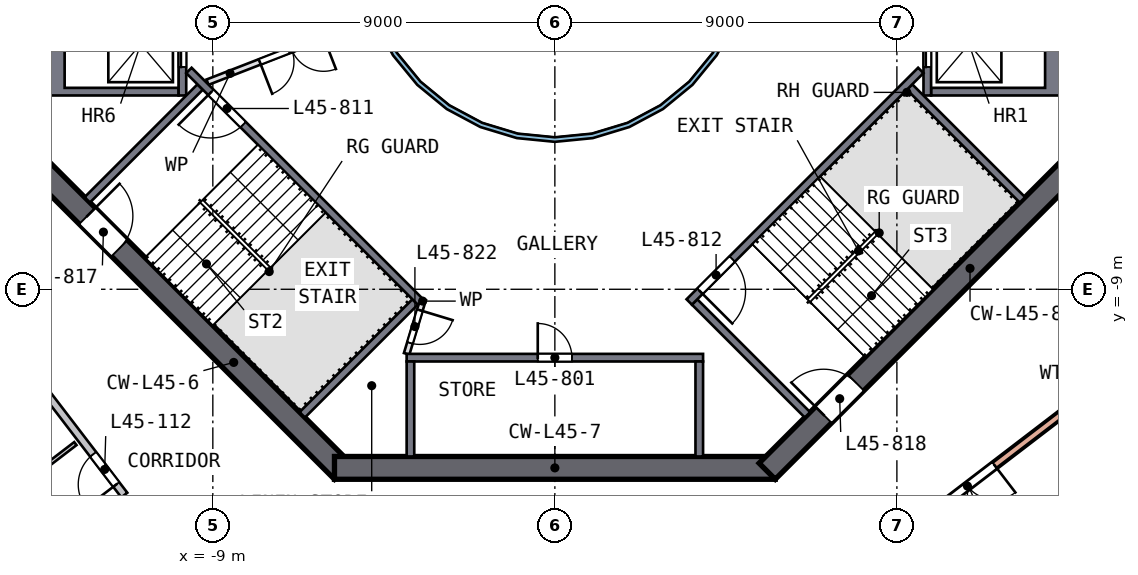
"""IFC4 building model, lengths in metres.
Left out: names, types, materials, properties, quantities, classifications, styles, units other than length and angle.
Written with IfcOpenShell. Run it as: python <this file> out.ifc"""

import sys

from ifc_helpers import new_model, si_unit, direction, frame, frame_2d, origin, place, context, subcontext, project, spatial, polyline, rectangle, outline, extrude, element, fill, save


model = new_model("IFC4")
c1 = context("Model", 3, precision=1e-05, world=origin(), true_north=direction((0.0, 1.0)))
c2 = subcontext(c1, "Body", "Model", "MODEL_VIEW")
j1 = project(units=[si_unit("LENGTHUNIT", "METRE"), si_unit("PLANEANGLEUNIT", "RADIAN")], contexts=[c1])
p1 = place(None, origin())
s1 = spatial("IfcSite", under=j1, at=p1, CompositionType="ELEMENT")
p2 = place(p1, origin())
s2 = spatial("IfcBuilding", under=s1, at=p2, CompositionType="ELEMENT")
p3 = place(p2, frame((0.0, 0.0, 187.0)))
s3 = spatial("IfcBuildingStorey", under=s2, at=p3, CompositionType="ELEMENT", Elevation=187.0)
p4 = place(p3, frame((-13.788, -5.587, 0.0), z_axis=(0.0, 0.0, 1.0), x_axis=(0.707106781, -0.707106781, 0.0)))
e1 = element("IfcWall", 1, at=p4, inside=s3, PredefinedType="SHEAR", context=c2, shape_type="SweptSolid", body=[
    extrude(rectangle(XDim=11.598, YDim=0.6, at=frame_2d((5.799, 0.0))), origin(), (0.0, 0.0, 1.0), 3.5),
])
p5 = place(p4, frame((2.099, 0.0, 0.0)))
e2 = element("IfcOpeningElement", 2, at=p5, cuts=e1, PredefinedType="OPENING", context=c2, shape_type="SweptSolid", body=[
    extrude(rectangle(XDim=1.2, YDim=2.1, at=frame_2d((0.6, 1.05))), frame((0.0, 0.31, 0.0), z_axis=(0.0, -1.0, 0.0), x_axis=(1.0, 0.0, 0.0)), (0.0, 0.0, 1.0), 0.62),
])
p6 = place(p3, frame((-5.799, -13.7, 0.0), z_axis=(0.0, 0.0, 1.0), x_axis=(1.0, 0.0, 0.0)))
e3 = element("IfcWall", 3, at=p6, inside=s3, PredefinedType="SHEAR", context=c2, shape_type="SweptSolid", body=[
    extrude(rectangle(XDim=11.598, YDim=0.6, at=frame_2d((5.799, 0.0))), origin(), (0.0, 0.0, 1.0), 3.5),
])
p7 = place(p3, frame((5.587, -13.788, 0.0), z_axis=(0.0, 0.0, 1.0), x_axis=(0.707106781, 0.707106781, 0.0)))
e4 = element("IfcWall", 4, at=p7, inside=s3, PredefinedType="SHEAR", context=c2, shape_type="SweptSolid", body=[
    extrude(rectangle(XDim=11.598, YDim=0.6, at=frame_2d((5.799, 0.0))), origin(), (0.0, 0.0, 1.0), 3.5),
])
p8 = place(p7, frame((2.099, 0.0, 0.0)))
e5 = element("IfcOpeningElement", 5, at=p8, cuts=e4, PredefinedType="OPENING", context=c2, shape_type="SweptSolid", body=[
    extrude(rectangle(XDim=1.2, YDim=2.1, at=frame_2d((0.6, 1.05))), frame((0.0, 0.31, 0.0), z_axis=(0.0, -1.0, 0.0), x_axis=(1.0, 0.0, 0.0)), (0.0, 0.0, 1.0), 0.62),
])
p9 = place(p3, frame((16.018, -10.228, 0.0), z_axis=(0.0, 0.0, 1.0), x_axis=(-0.793988274, -0.607933072, 0.0)))
e6 = element("IfcWall", 6, at=p9, inside=s3, PredefinedType="SOLIDWALL", context=c2, shape_type="SweptSolid", body=[
    extrude(rectangle(XDim=13.0, YDim=0.2, at=frame_2d((6.5, 0.0))), origin(), (0.0, 0.0, 1.0), 3.19),
])
p10 = place(p9, frame((5.6, 0.0, 0.0)))
e7 = element("IfcOpeningElement", 7, at=p10, cuts=e6, PredefinedType="OPENING", context=c2, shape_type="SweptSolid", body=[
    extrude(rectangle(XDim=1.8, YDim=2.4, at=frame_2d((0.9, 1.2))), frame((0.0, 0.11, 0.0), z_axis=(0.0, -1.0, 0.0), x_axis=(1.0, 0.0, 0.0)), (0.0, 0.0, 1.0), 0.22),
])
p11 = place(p3, origin())
e8 = element("IfcWall", 8, at=p11, inside=s3, PredefinedType="SOLIDWALL", context=c2, shape_type="SweptSolid", body=[
    extrude(outline(polyline([(13.4, -3.9), (9.9, -3.9), (9.9, -3.7), (12.9, -3.7), (12.9, -1.4), (9.9, -1.4), (9.9, -1.2), (13.4, -1.2), (13.4, -3.9)])), origin(), (0.0, 0.0, 1.0), 3.19),
])
p12 = place(p3, frame((9.8, -1.2, 0.0), z_axis=(0.0, 0.0, 1.0), x_axis=(0.0, -1.0, 0.0)))
e9 = element("IfcWall", 9, at=p12, inside=s3, PredefinedType="SOLIDWALL", context=c2, shape_type="SweptSolid", body=[
    extrude(rectangle(XDim=2.7, YDim=0.2, at=frame_2d((1.35, 0.0))), origin(), (0.0, 0.0, 1.0), 3.19),
])
p13 = place(p12, frame((0.75, 0.0, 0.0)))
e10 = element("IfcOpeningElement", 10, at=p13, cuts=e9, PredefinedType="OPENING", context=c2, shape_type="SweptSolid", body=[
    extrude(rectangle(XDim=1.2, YDim=2.1, at=frame_2d((0.6, 1.05))), frame((0.0, 0.11, 0.0), z_axis=(0.0, -1.0, 0.0), x_axis=(1.0, 0.0, 0.0)), (0.0, 0.0, 1.0), 0.22),
])
p14 = place(p3, origin())
e11 = element("IfcWall", 11, at=p14, inside=s3, PredefinedType="SOLIDWALL", context=c2, shape_type="SweptSolid", body=[
    extrude(outline(polyline([(-13.4, -3.9), (-13.4, -1.2), (-9.9, -1.2), (-9.9, -1.4), (-12.9, -1.4), (-12.9, -3.7), (-9.9, -3.7), (-9.9, -3.9), (-13.4, -3.9)])), origin(), (0.0, 0.0, 1.0), 3.19),
])
p15 = place(p3, frame((-9.8, -1.2, 0.0), z_axis=(0.0, 0.0, 1.0), x_axis=(0.0, -1.0, 0.0)))
e12 = element("IfcWall", 12, at=p15, inside=s3, PredefinedType="SOLIDWALL", context=c2, shape_type="SweptSolid", body=[
    extrude(rectangle(XDim=2.7, YDim=0.2, at=frame_2d((1.35, 0.0))), origin(), (0.0, 0.0, 1.0), 3.19),
])
p16 = place(p15, frame((0.75, 0.0, 0.0)))
e13 = element("IfcOpeningElement", 13, at=p16, cuts=e12, PredefinedType="OPENING", context=c2, shape_type="SweptSolid", body=[
    extrude(rectangle(XDim=1.2, YDim=2.1, at=frame_2d((0.6, 1.05))), frame((0.0, 0.11, 0.0), z_axis=(0.0, -1.0, 0.0), x_axis=(1.0, 0.0, 0.0)), (0.0, 0.0, 1.0), 0.22),
])
p17 = place(p3, frame((-3.9, -10.8, 0.0), z_axis=(0.0, 0.0, 1.0), x_axis=(1.0, 0.0, 0.0)))
e14 = element("IfcWall", 14, at=p17, inside=s3, PredefinedType="SOLIDWALL", context=c2, shape_type="SweptSolid", body=[
    extrude(rectangle(XDim=7.8, YDim=0.2, at=frame_2d((3.9, 0.0))), origin(), (0.0, 0.0, 1.0), 3.19),
])
p18 = place(p17, frame((3.45, 0.0, 0.0)))
e15 = element("IfcOpeningElement", 15, at=p18, cuts=e14, PredefinedType="OPENING", context=c2, shape_type="SweptSolid", body=[
    extrude(rectangle(XDim=0.9, YDim=2.1, at=frame_2d((0.45, 1.05))), frame((0.0, 0.11, 0.0), z_axis=(0.0, -1.0, 0.0), x_axis=(1.0, 0.0, 0.0)), (0.0, 0.0, 1.0), 0.22),
])
for number, where, z_axis, x_axis in (
    (16, (-3.8, -10.9, 0.0), (0.0, 0.0, 1.0), (0.0, -1.0, 0.0)),
    (17, (3.8, -10.9, 0.0), (0.0, 0.0, 1.0), (0.0, -1.0, 0.0)),
):
    element("IfcWall", number, at=place(p3, frame(where, z_axis=z_axis, x_axis=x_axis)), inside=s3, PredefinedType="SOLIDWALL", context=c2, shape_type="SweptSolid", body=[
        extrude(rectangle(XDim=2.5, YDim=0.2, at=frame_2d((1.25, 0.0))), origin(), (0.0, 0.0, 1.0), 3.19),
    ])
p19 = place(p3, frame((-3.535, -9.334, 0.0), z_axis=(0.0, 0.0, 1.0), x_axis=(-0.707120946, 0.707092617, 0.0)))
e18 = element("IfcWall", 18, at=p19, inside=s3, PredefinedType="SOLIDWALL", context=c2, shape_type="SweptSolid", body=[
    extrude(rectangle(XDim=8.618, YDim=0.2, at=frame_2d((4.309, 0.0))), origin(), (0.0, 0.0, 1.0), 3.19),
])
p20 = place(p19, frame((6.6, 0.0, 0.0)))
e19 = element("IfcOpeningElement", 19, at=p20, cuts=e18, PredefinedType="OPENING", context=c2, shape_type="SweptSolid", body=[
    extrude(rectangle(XDim=1.2, YDim=2.1, at=frame_2d((0.6, 1.05))), frame((0.0, 0.11, 0.0), z_axis=(0.0, -1.0, 0.0), x_axis=(1.0, 0.0, 0.0)), (0.0, 0.0, 1.0), 0.22),
])
for number, where, z_axis, x_axis in (
    (20, (-9.334, -3.677, 0.0), (0.0, 0.0, 1.0), (-0.707, -0.707, 0.0)),
    (21, (-3.677, -9.334, 0.0), (0.0, 0.0, 1.0), (-0.707, -0.707, 0.0)),
):
    element("IfcWall", number, at=place(p3, frame(where, z_axis=z_axis, x_axis=x_axis)), inside=s3, PredefinedType="SOLIDWALL", context=c2, shape_type="SweptSolid", body=[
        extrude(rectangle(XDim=4.2, YDim=0.2, at=frame_2d((2.1, 0.0))), origin(), (0.0, 0.0, 1.0), 3.19),
    ])
p21 = place(p3, frame((9.629, -3.24, 0.0), z_axis=(0.0, 0.0, 1.0), x_axis=(-0.707120946, -0.707092617, 0.0)))
e22 = element("IfcWall", 22, at=p21, inside=s3, PredefinedType="SOLIDWALL", context=c2, shape_type="SweptSolid", body=[
    extrude(rectangle(XDim=8.618, YDim=0.2, at=frame_2d((4.309, 0.0))), origin(), (0.0, 0.0, 1.0), 3.19),
])
p22 = place(p21, frame((7.018, 0.0, 0.0)))
e23 = element("IfcOpeningElement", 23, at=p22, cuts=e22, PredefinedType="OPENING", context=c2, shape_type="SweptSolid", body=[
    extrude(rectangle(XDim=1.2, YDim=2.1, at=frame_2d((0.6, 1.05))), frame((0.0, 0.11, 0.0), z_axis=(0.0, -1.0, 0.0), x_axis=(1.0, 0.0, 0.0)), (0.0, 0.0, 1.0), 0.22),
])
for number, where, z_axis, x_axis in (
    (24, (3.677, -9.334, 0.0), (0.0, 0.0, 1.0), (0.707, -0.707, 0.0)),
    (25, (9.334, -3.677, 0.0), (0.0, 0.0, 1.0), (0.707, -0.707, 0.0)),
):
    element("IfcWall", number, at=place(p3, frame(where, z_axis=z_axis, x_axis=x_axis)), inside=s3, PredefinedType="SOLIDWALL", context=c2, shape_type="SweptSolid", body=[
        extrude(rectangle(XDim=4.2, YDim=0.2, at=frame_2d((2.1, 0.0))), origin(), (0.0, 0.0, 1.0), 3.19),
    ])
p23 = place(p3, frame((-3.465, -9.263, 0.0), z_axis=(0.0, 0.0, 1.0), x_axis=(-0.289808785, -0.957084567, 0.0)))
e26 = element("IfcWall", 26, at=p23, inside=s3, PredefinedType="PARTITIONING", context=c2, shape_type="SweptSolid", body=[
    extrude(rectangle(XDim=1.501, YDim=0.15, at=frame_2d((0.75, 0.0))), origin(), (0.0, 0.0, 1.0), 3.19),
])
p24 = place(p23, frame((0.301, 0.0, 0.0)))
e27 = element("IfcOpeningElement", 27, at=p24, cuts=e26, PredefinedType="OPENING", context=c2, shape_type="SweptSolid", body=[
    extrude(rectangle(XDim=0.9, YDim=2.1, at=frame_2d((0.45, 1.05))), frame((0.0, 0.085, 0.0), z_axis=(0.0, -1.0, 0.0), x_axis=(1.0, 0.0, 0.0)), (0.0, 0.0, 1.0), 0.17),
])
p25 = place(p3, frame((-4.782, -1.857, 0.0), z_axis=(0.0, 0.0, 1.0), x_axis=(-0.932157474, -0.362053096, 0.0)))
e28 = element("IfcWall", 28, at=p25, inside=s3, PredefinedType="PARTITIONING", context=c2, shape_type="SweptSolid", body=[
    extrude(rectangle(XDim=4.675, YDim=0.15, at=frame_2d((2.337, 0.0))), origin(), (0.0, 0.0, 1.0), 3.19),
])
p26 = place(p25, frame((1.4, 0.0, 0.0)))
e29 = element("IfcOpeningElement", 29, at=p26, cuts=e28, PredefinedType="OPENING", context=c2, shape_type="SweptSolid", body=[
    extrude(rectangle(XDim=1.8, YDim=2.1, at=frame_2d((0.9, 1.05))), frame((0.0, 0.085, 0.0), z_axis=(0.0, -1.0, 0.0), x_axis=(1.0, 0.0, 0.0)), (0.0, 0.0, 1.0), 0.17),
])
p27 = place(p3, origin())
e30 = element("IfcWall", 30, at=p27, inside=s3, PredefinedType="SOLIDWALL", context=c2, shape_type="SweptSolid", body=[
    extrude(outline(polyline([(5.021, -0.999), (4.73, -1.959), (4.257, -2.844), (3.62, -3.62), (2.844, -4.257), (1.959, -4.73), (0.999, -5.021), (0.0, -5.12), (-0.999, -5.021), (-1.959, -4.73), (-2.844, -4.257), (-3.62, -3.62), (-4.257, -2.844), (-4.73, -1.959), (-5.021, -0.999), (-5.12, 0.0), (-5.021, 0.999), (-4.73, 1.959), (-4.257, 2.844), (-3.62, 3.62), (-2.844, 4.257), (-1.959, 4.73), (-0.999, 5.021), (0.0, 5.12), (0.999, 5.021), (1.959, 4.73), (2.844, 4.257), (3.62, 3.62), (4.257, 2.844), (4.73, 1.959), (5.021, 0.999), (5.12, 0.0), (5.021, -0.999)]), holes=[polyline([(4.904, 0.976), (4.619, 1.913), (4.157, 2.778), (3.535, 3.535), (2.778, 4.157), (1.913, 4.619), (0.976, 4.904), (0.0, 5.0), (-0.976, 4.904), (-1.913, 4.619), (-2.778, 4.157), (-3.535, 3.535), (-4.157, 2.778), (-4.619, 1.913), (-4.904, 0.976), (-5.0, 0.0), (-4.904, -0.976), (-4.619, -1.913), (-4.157, -2.778), (-3.535, -3.535), (-2.778, -4.157), (-1.913, -4.619), (-0.976, -4.904), (0.0, -5.0), (0.976, -4.904), (1.913, -4.619), (2.778, -4.157), (3.535, -3.535), (4.157, -2.778), (4.619, -1.913), (4.904, -0.976), (5.0, 0.0), (4.904, 0.976)])]), origin(), (0.0, 0.0, 1.0), 3.19),
])
p28 = place(p3, frame((-11.329, -14.415, 0.0), z_axis=(0.0, 0.0, 1.0), x_axis=(-0.607927122, 0.79399283, 0.0)))
e31 = element("IfcWall", 31, at=p28, inside=s3, PredefinedType="SOLIDWALL", context=c2, shape_type="SweptSolid", body=[
    extrude(rectangle(XDim=9.117, YDim=0.2, at=frame_2d((4.558, 0.0))), origin(), (0.0, 0.0, 1.0), 3.19),
])
p29 = place(p28, frame((0.35, 0.0, 0.0)))
e32 = element("IfcOpeningElement", 32, at=p29, cuts=e31, PredefinedType="OPENING", context=c2, shape_type="SweptSolid", body=[
    extrude(rectangle(XDim=1.0, YDim=2.1, at=frame_2d((0.5, 1.05))), frame((0.0, 0.11, 0.0), z_axis=(0.0, -1.0, 0.0), x_axis=(1.0, 0.0, 0.0)), (0.0, 0.0, 1.0), 0.22),
])
p30 = place(p3, frame((-14.999, -14.885, 0.0), z_axis=(0.0, 0.0, 1.0), x_axis=(0.794013533, 0.607900081, 0.0)))
e33 = element("IfcWall", 33, at=p30, inside=s3, PredefinedType="PARTITIONING", context=c2, shape_type="SweptSolid", body=[
    extrude(rectangle(XDim=3.0, YDim=0.1, at=frame_2d((1.5, 0.0))), origin(), (0.0, 0.0, 1.0), 3.19),
])
p31 = place(p30, frame((1.15, 0.0, 0.0)))
e34 = element("IfcOpeningElement", 34, at=p31, cuts=e33, PredefinedType="OPENING", context=c2, shape_type="SweptSolid", body=[
    extrude(rectangle(XDim=0.9, YDim=2.1, at=frame_2d((0.45, 1.05))), frame((0.0, 0.06, 0.0), z_axis=(0.0, -1.0, 0.0), x_axis=(1.0, 0.0, 0.0)), (0.0, 0.0, 1.0), 0.12),
])
p32 = place(p10, origin())
e35 = element("IfcDoor", 35, at=p32, inside=s3, OperationType="DOUBLE_DOOR_SINGLE_SWING", PredefinedType="DOOR", context=c2, shape_type="SweptSolid", body=[
    extrude(rectangle(XDim=1.8, YDim=2.4, at=frame_2d((0.9, 1.2))), frame((0.0, 0.025, 0.0), z_axis=(0.0, -1.0, 0.0), x_axis=(1.0, 0.0, 0.0)), (0.0, 0.0, 1.0), 0.05),
])
fill(e7, e35)
p33 = place(p18, origin())
e36 = element("IfcDoor", 36, at=p33, inside=s3, OperationType="SINGLE_SWING_LEFT", PredefinedType="DOOR", context=c2, shape_type="SweptSolid", body=[
    extrude(rectangle(XDim=0.9, YDim=2.1, at=frame_2d((0.45, 1.05))), frame((0.0, 0.025, 0.0), z_axis=(0.0, -1.0, 0.0), x_axis=(1.0, 0.0, 0.0)), (0.0, 0.0, 1.0), 0.05),
])
fill(e15, e36)
p34 = place(p13, origin())
e37 = element("IfcDoor", 37, at=p34, inside=s3, OperationType="DOUBLE_DOOR_SLIDING", PredefinedType="DOOR", context=c2, shape_type="SweptSolid", body=[
    extrude(rectangle(XDim=1.2, YDim=2.1, at=frame_2d((0.6, 1.05))), frame((0.0, 0.025, 0.0), z_axis=(0.0, -1.0, 0.0), x_axis=(1.0, 0.0, 0.0)), (0.0, 0.0, 1.0), 0.05),
])
fill(e10, e37)
p35 = place(p16, origin())
e38 = element("IfcDoor", 38, at=p35, inside=s3, OperationType="DOUBLE_DOOR_SLIDING", PredefinedType="DOOR", context=c2, shape_type="SweptSolid", body=[
    extrude(rectangle(XDim=1.2, YDim=2.1, at=frame_2d((0.6, 1.05))), frame((0.0, 0.025, 0.0), z_axis=(0.0, -1.0, 0.0), x_axis=(1.0, 0.0, 0.0)), (0.0, 0.0, 1.0), 0.05),
])
fill(e13, e38)
p36 = place(p20, origin())
e39 = element("IfcDoor", 39, at=p36, inside=s3, OperationType="SINGLE_SWING_RIGHT", PredefinedType="DOOR", context=c2, shape_type="SweptSolid", body=[
    extrude(rectangle(XDim=1.2, YDim=2.1, at=frame_2d((0.6, 1.05))), frame((0.0, 0.025, 0.0), z_axis=(0.0, -1.0, 0.0), x_axis=(1.0, 0.0, 0.0)), (0.0, 0.0, 1.0), 0.05),
])
fill(e19, e39)
p37 = place(p22, origin())
e40 = element("IfcDoor", 40, at=p37, inside=s3, OperationType="SINGLE_SWING_RIGHT", PredefinedType="DOOR", context=c2, shape_type="SweptSolid", body=[
    extrude(rectangle(XDim=1.2, YDim=2.1, at=frame_2d((0.6, 1.05))), frame((0.0, 0.025, 0.0), z_axis=(0.0, -1.0, 0.0), x_axis=(1.0, 0.0, 0.0)), (0.0, 0.0, 1.0), 0.05),
])
fill(e23, e40)
p38 = place(p5, origin())
e41 = element("IfcDoor", 41, at=p38, inside=s3, OperationType="SINGLE_SWING_LEFT", PredefinedType="DOOR", context=c2, shape_type="SweptSolid", body=[
    extrude(rectangle(XDim=1.2, YDim=2.1, at=frame_2d((0.6, 1.05))), frame((0.0, 0.025, 0.0), z_axis=(0.0, -1.0, 0.0), x_axis=(1.0, 0.0, 0.0)), (0.0, 0.0, 1.0), 0.05),
])
fill(e2, e41)
p39 = place(p8, origin())
e42 = element("IfcDoor", 42, at=p39, inside=s3, OperationType="SINGLE_SWING_LEFT", PredefinedType="DOOR", context=c2, shape_type="SweptSolid", body=[
    extrude(rectangle(XDim=1.2, YDim=2.1, at=frame_2d((0.6, 1.05))), frame((0.0, 0.025, 0.0), z_axis=(0.0, -1.0, 0.0), x_axis=(1.0, 0.0, 0.0)), (0.0, 0.0, 1.0), 0.05),
])
fill(e5, e42)
p40 = place(p24, origin())
e43 = element("IfcDoor", 43, at=p40, inside=s3, OperationType="SINGLE_SWING_LEFT", PredefinedType="DOOR", context=c2, shape_type="SweptSolid", body=[
    extrude(rectangle(XDim=0.9, YDim=2.1, at=frame_2d((0.45, 1.05))), frame((0.0, 0.025, 0.0), z_axis=(0.0, -1.0, 0.0), x_axis=(1.0, 0.0, 0.0)), (0.0, 0.0, 1.0), 0.05),
])
fill(e27, e43)
p41 = place(p26, origin())
e44 = element("IfcDoor", 44, at=p41, inside=s3, OperationType="DOUBLE_DOOR_SINGLE_SWING", PredefinedType="DOOR", context=c2, shape_type="SweptSolid", body=[
    extrude(rectangle(XDim=1.8, YDim=2.1, at=frame_2d((0.9, 1.05))), frame((0.0, 0.025, 0.0), z_axis=(0.0, -1.0, 0.0), x_axis=(1.0, 0.0, 0.0)), (0.0, 0.0, 1.0), 0.05),
])
fill(e29, e44)
p42 = place(p29, origin())
e45 = element("IfcDoor", 45, at=p42, inside=s3, OperationType="SINGLE_SWING_LEFT", PredefinedType="DOOR", context=c2, shape_type="SweptSolid", body=[
    extrude(rectangle(XDim=1.0, YDim=2.1, at=frame_2d((0.5, 1.05))), frame((0.0, 0.025, 0.0), z_axis=(0.0, -1.0, 0.0), x_axis=(1.0, 0.0, 0.0)), (0.0, 0.0, 1.0), 0.05),
])
fill(e32, e45)
save(model, sys.argv[1])
